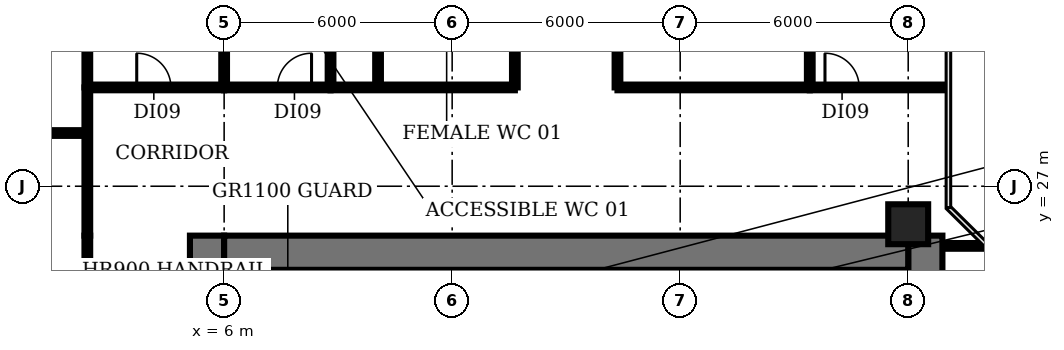
"""IFC4 building model, lengths in metres.
Left out: names, types, materials, properties, quantities, classifications, styles, units other than length and angle.
Written with IfcOpenShell. Run it as: python <this file> out.ifc"""

import sys

from ifc_helpers import new_model, si_unit, direction, frame, frame_2d, origin, origin_2d, place, context, subcontext, project, spatial, rectangle, circle, extrude, element, fill, save


model = new_model("IFC4")
c1 = context("Model", 3, precision=1e-05, world=origin(), true_north=direction((0.0, 1.0)))
c2 = subcontext(c1, "Body", "Model", "MODEL_VIEW")
j1 = project(units=[si_unit("LENGTHUNIT", "METRE"), si_unit("PLANEANGLEUNIT", "RADIAN")], contexts=[c1])
p1 = place(None, origin())
s1 = spatial("IfcSite", under=j1, at=p1, CompositionType="ELEMENT")
p2 = place(p1, origin())
s2 = spatial("IfcBuilding", under=s1, at=p2, CompositionType="ELEMENT")
p3 = place(p2, frame((0.0, 0.0, 54.2)))
s3 = spatial("IfcBuildingStorey", under=s2, at=p3, CompositionType="ELEMENT", Elevation=54.2)
p4 = place(p3, frame((24.0, 26.0, 0.0), z_axis=(0.0, 0.0, 1.0), x_axis=(1.0, 0.0, 0.0)))
e1 = element("IfcColumn", 1, at=p4, inside=s3, PredefinedType="COLUMN", context=c2, shape_type="SweptSolid", body=[
    extrude(circle(Radius=0.525, at=origin_2d()), origin(), (0.0, 0.0, 1.0), 3.85),
])
p5 = place(p3, frame((9.275, 18.375, 0.0), z_axis=(0.0, 0.0, 1.0), x_axis=(0.0, 1.0, 0.0)))
e2 = element("IfcWall", 2, at=p5, inside=s3, PredefinedType="SHEAR", context=c2, shape_type="SweptSolid", body=[
    extrude(rectangle(XDim=6.425, YDim=0.25, at=frame_2d((3.212, 0.0))), origin(), (0.0, 0.0, 1.0), 3.85),
])
for number, where, z_axis, x_axis in (
    (3, (15.1, 22.9, 0.0), (0.0, 0.0, 1.0), (0.0, 1.0, 0.0)),
    (4, (20.7, 22.9, 0.0), (0.0, 0.0, 1.0), (0.0, 1.0, 0.0)),
):
    element("IfcWall", number, at=place(p3, frame(where, z_axis=z_axis, x_axis=x_axis)), inside=s3, PredefinedType="SHEAR", context=c2, shape_type="SweptSolid", body=[
        extrude(rectangle(XDim=1.9, YDim=0.2, at=frame_2d((0.95, 0.0))), origin(), (0.0, 0.0, 1.0), 3.85),
    ])
p6 = place(p3, frame((5.55, 4.5, 0.0), z_axis=(0.0, 0.0, 1.0), x_axis=(0.0, 1.0, 0.0)))
e5 = element("IfcWall", 5, at=p6, inside=s3, PredefinedType="SHEAR", context=c2, shape_type="SweptSolid", body=[
    extrude(rectangle(XDim=21.2, YDim=0.9, at=frame_2d((10.6, 0.0))), origin(), (0.0, 0.0, 1.0), 3.85),
])
p7 = place(p6, frame((1.15, 0.0, 0.0)))
e6 = element("IfcOpeningElement", 6, at=p7, cuts=e5, PredefinedType="OPENING", context=c2, shape_type="SweptSolid", body=[
    extrude(rectangle(XDim=1.5, YDim=2.1, at=frame_2d((0.75, 1.05))), frame((0.0, 0.46, 0.0), z_axis=(0.0, -1.0, 0.0), x_axis=(1.0, 0.0, 0.0)), (0.0, 0.0, 1.0), 0.92),
])
p8 = place(p6, frame((7.6, 0.0, 0.0)))
e7 = element("IfcOpeningElement", 7, at=p8, cuts=e5, PredefinedType="OPENING", context=c2, shape_type="SweptSolid", body=[
    extrude(rectangle(XDim=1.2, YDim=2.1, at=frame_2d((0.6, 1.05))), frame((0.0, 0.46, 0.0), z_axis=(0.0, -1.0, 0.0), x_axis=(1.0, 0.0, 0.0)), (0.0, 0.0, 1.0), 0.92),
])
p9 = place(p6, frame((14.15, 0.0, 0.0)))
e8 = element("IfcOpeningElement", 8, at=p9, cuts=e5, PredefinedType="OPENING", context=c2, shape_type="SweptSolid", body=[
    extrude(rectangle(XDim=1.2, YDim=2.1, at=frame_2d((0.6, 1.05))), frame((0.0, 0.46, 0.0), z_axis=(0.0, -1.0, 0.0), x_axis=(1.0, 0.0, 0.0)), (0.0, 0.0, 1.0), 0.92),
])
p10 = place(p3, frame((24.45, 25.7, 0.0), z_axis=(0.0, 0.0, 1.0), x_axis=(0.0, -1.0, 0.0)))
e9 = element("IfcWall", 9, at=p10, inside=s3, PredefinedType="SHEAR", context=c2, shape_type="SweptSolid", body=[
    extrude(rectangle(XDim=21.2, YDim=0.9, at=frame_2d((10.6, 0.0))), origin(), (0.0, 0.0, 1.0), 3.85),
])
p11 = place(p10, frame((18.55, 0.0, 0.0)))
e10 = element("IfcOpeningElement", 10, at=p11, cuts=e9, PredefinedType="OPENING", context=c2, shape_type="SweptSolid", body=[
    extrude(rectangle(XDim=1.5, YDim=2.1, at=frame_2d((0.75, 1.05))), frame((0.0, 0.46, 0.0), z_axis=(0.0, -1.0, 0.0), x_axis=(1.0, 0.0, 0.0)), (0.0, 0.0, 1.0), 0.92),
])
p12 = place(p10, frame((12.45, 0.0, 0.0)))
e11 = element("IfcOpeningElement", 11, at=p12, cuts=e9, PredefinedType="OPENING", context=c2, shape_type="SweptSolid", body=[
    extrude(rectangle(XDim=0.9, YDim=2.1, at=frame_2d((0.45, 1.05))), frame((0.0, 0.46, 0.0), z_axis=(0.0, -1.0, 0.0), x_axis=(1.0, 0.0, 0.0)), (0.0, 0.0, 1.0), 0.92),
])
p13 = place(p10, frame((6.45, 0.0, 0.0)))
e12 = element("IfcOpeningElement", 12, at=p13, cuts=e9, PredefinedType="OPENING", context=c2, shape_type="SweptSolid", body=[
    extrude(rectangle(XDim=2.0, YDim=2.1, at=frame_2d((1.0, 1.05))), frame((0.0, 0.46, 0.0), z_axis=(0.0, -1.0, 0.0), x_axis=(1.0, 0.0, 0.0)), (0.0, 0.0, 1.0), 0.92),
])
p14 = place(p3, frame((6.0, 25.25, 0.0), z_axis=(0.0, 0.0, 1.0), x_axis=(1.0, 0.0, 0.0)))
e13 = element("IfcWall", 13, at=p14, inside=s3, PredefinedType="SHEAR", context=c2, shape_type="SweptSolid", body=[
    extrude(rectangle(XDim=18.0, YDim=0.9, at=frame_2d((9.0, 0.0))), origin(), (0.0, 0.0, 1.0), 3.85),
])
p15 = place(p3, frame((-1.04, 28.4, 0.0), z_axis=(0.0, 0.0, 1.0), x_axis=(1.0, 0.0, 0.0)))
e14 = element("IfcWall", 14, at=p15, inside=s3, PredefinedType="PARTITIONING", context=c2, shape_type="SweptSolid", body=[
    extrude(rectangle(XDim=3.44, YDim=0.15, at=frame_2d((1.72, 0.0))), origin(), (0.0, 0.0, 1.0), 2.83),
])
p16 = place(p3, frame((2.4, 4.5, 0.0), z_axis=(0.0, 0.0, 1.0), x_axis=(0.0, 1.0, 0.0)))
e15 = element("IfcWall", 15, at=p16, inside=s3, PredefinedType="PARTITIONING", context=c2, shape_type="SweptSolid", body=[
    extrude(rectangle(XDim=21.2, YDim=0.15, at=frame_2d((10.6, 0.0))), origin(), (0.0, 0.0, 1.0), 2.83),
])
p17 = place(p16, frame((10.8, 0.0, 0.0)))
e16 = element("IfcOpeningElement", 16, at=p17, cuts=e15, PredefinedType="OPENING", context=c2, shape_type="SweptSolid", body=[
    extrude(rectangle(XDim=1.2, YDim=2.1, at=frame_2d((0.6, 1.05))), frame((0.0, 0.085, 0.0), z_axis=(0.0, -1.0, 0.0), x_axis=(1.0, 0.0, 0.0)), (0.0, 0.0, 1.0), 0.17),
])
p18 = place(p3, frame((2.4, 25.7, 0.0), z_axis=(0.0, 0.0, 1.0), x_axis=(0.0, 1.0, 0.0)))
e17 = element("IfcWall", 17, at=p18, inside=s3, PredefinedType="PARTITIONING", context=c2, shape_type="SweptSolid", body=[
    extrude(rectangle(XDim=3.9, YDim=0.15, at=frame_2d((1.95, 0.0))), origin(), (0.0, 0.0, 1.0), 2.83),
])
p19 = place(p3, frame((2.4, 29.6, 0.0), z_axis=(0.0, 0.0, 1.0), x_axis=(0.0, 1.0, 0.0)))
e18 = element("IfcWall", 18, at=p19, inside=s3, PredefinedType="PARTITIONING", context=c2, shape_type="SweptSolid", body=[
    extrude(rectangle(XDim=4.8, YDim=0.15, at=frame_2d((2.4, 0.0))), origin(), (0.0, 0.0, 1.0), 2.83),
])
p20 = place(p3, frame((2.4, 29.6, 0.0), z_axis=(0.0, 0.0, 1.0), x_axis=(1.0, 0.0, 0.0)))
e19 = element("IfcWall", 19, at=p20, inside=s3, PredefinedType="PARTITIONING", context=c2, shape_type="SweptSolid", body=[
    extrude(rectangle(XDim=3.6, YDim=0.15, at=frame_2d((1.8, 0.0))), origin(), (0.0, 0.0, 1.0), 2.83),
])
p21 = place(p20, frame((1.3, 0.0, 0.0)))
e20 = element("IfcOpeningElement", 20, at=p21, cuts=e19, PredefinedType="OPENING", context=c2, shape_type="SweptSolid", body=[
    extrude(rectangle(XDim=0.9, YDim=2.1, at=frame_2d((0.45, 1.05))), frame((0.0, 0.085, 0.0), z_axis=(0.0, -1.0, 0.0), x_axis=(1.0, 0.0, 0.0)), (0.0, 0.0, 1.0), 0.17),
])
p22 = place(p3, frame((6.0, 29.6, 0.0), z_axis=(0.0, 0.0, 1.0), x_axis=(0.0, 1.0, 0.0)))
e21 = element("IfcWall", 21, at=p22, inside=s3, PredefinedType="PARTITIONING", context=c2, shape_type="SweptSolid", body=[
    extrude(rectangle(XDim=4.8, YDim=0.15, at=frame_2d((2.4, 0.0))), origin(), (0.0, 0.0, 1.0), 2.83),
])
p23 = place(p3, frame((6.0, 29.6, 0.0), z_axis=(0.0, 0.0, 1.0), x_axis=(1.0, 0.0, 0.0)))
e22 = element("IfcWall", 22, at=p23, inside=s3, PredefinedType="PARTITIONING", context=c2, shape_type="SweptSolid", body=[
    extrude(rectangle(XDim=2.8, YDim=0.15, at=frame_2d((1.4, 0.0))), origin(), (0.0, 0.0, 1.0), 2.83),
])
p24 = place(p23, frame((1.4, 0.0, 0.0)))
e23 = element("IfcOpeningElement", 23, at=p24, cuts=e22, PredefinedType="OPENING", context=c2, shape_type="SweptSolid", body=[
    extrude(rectangle(XDim=0.9, YDim=2.1, at=frame_2d((0.45, 1.05))), frame((0.0, 0.085, 0.0), z_axis=(0.0, -1.0, 0.0), x_axis=(1.0, 0.0, 0.0)), (0.0, 0.0, 1.0), 0.17),
])
p25 = place(p3, frame((8.8, 29.6, 0.0), z_axis=(0.0, 0.0, 1.0), x_axis=(0.0, 1.0, 0.0)))
e24 = element("IfcWall", 24, at=p25, inside=s3, PredefinedType="PARTITIONING", context=c2, shape_type="SweptSolid", body=[
    extrude(rectangle(XDim=4.8, YDim=0.15, at=frame_2d((2.4, 0.0))), origin(), (0.0, 0.0, 1.0), 2.83),
])
p26 = place(p3, frame((8.8, 29.6, 0.0), z_axis=(0.0, 0.0, 1.0), x_axis=(1.0, 0.0, 0.0)))
e25 = element("IfcWall", 25, at=p26, inside=s3, PredefinedType="PARTITIONING", context=c2, shape_type="SweptSolid", body=[
    extrude(rectangle(XDim=4.85, YDim=0.15, at=frame_2d((2.425, 0.0))), origin(), (0.0, 0.0, 1.0), 2.83),
])
p27 = place(p3, frame((10.05, 29.6, 0.0), z_axis=(0.0, 0.0, 1.0), x_axis=(0.0, 1.0, 0.0)))
e26 = element("IfcWall", 26, at=p27, inside=s3, PredefinedType="PARTITIONING", context=c2, shape_type="SweptSolid", body=[
    extrude(rectangle(XDim=4.8, YDim=0.15, at=frame_2d((2.4, 0.0))), origin(), (0.0, 0.0, 1.0), 2.83),
])
p28 = place(p3, frame((13.65, 29.6, 0.0), z_axis=(0.0, 0.0, 1.0), x_axis=(0.0, 1.0, 0.0)))
e27 = element("IfcWall", 27, at=p28, inside=s3, PredefinedType="PARTITIONING", context=c2, shape_type="SweptSolid", body=[
    extrude(rectangle(XDim=4.8, YDim=0.15, at=frame_2d((2.4, 0.0))), origin(), (0.0, 0.0, 1.0), 2.83),
])
p29 = place(p28, frame((1.9, 0.0, 0.0)))
e28 = element("IfcOpeningElement", 28, at=p29, cuts=e27, PredefinedType="OPENING", context=c2, shape_type="SweptSolid", body=[
    extrude(rectangle(XDim=0.9, YDim=2.1, at=frame_2d((0.45, 1.05))), frame((0.0, 0.085, 0.0), z_axis=(0.0, -1.0, 0.0), x_axis=(1.0, 0.0, 0.0)), (0.0, 0.0, 1.0), 0.17),
])
p30 = place(p3, frame((16.35, 29.6, 0.0), z_axis=(0.0, 0.0, 1.0), x_axis=(0.0, 1.0, 0.0)))
e29 = element("IfcWall", 29, at=p30, inside=s3, PredefinedType="PARTITIONING", context=c2, shape_type="SweptSolid", body=[
    extrude(rectangle(XDim=4.8, YDim=0.15, at=frame_2d((2.4, 0.0))), origin(), (0.0, 0.0, 1.0), 2.83),
])
p31 = place(p3, frame((16.35, 29.6, 0.0), z_axis=(0.0, 0.0, 1.0), x_axis=(1.0, 0.0, 0.0)))
e30 = element("IfcWall", 30, at=p31, inside=s3, PredefinedType="PARTITIONING", context=c2, shape_type="SweptSolid", body=[
    extrude(rectangle(XDim=5.06, YDim=0.15, at=frame_2d((2.53, 0.0))), origin(), (0.0, 0.0, 1.0), 2.83),
])
p32 = place(p3, frame((21.41, 29.6, 0.0), z_axis=(0.0, 0.0, 1.0), x_axis=(0.0, 1.0, 0.0)))
e31 = element("IfcWall", 31, at=p32, inside=s3, PredefinedType="PARTITIONING", context=c2, shape_type="SweptSolid", body=[
    extrude(rectangle(XDim=4.8, YDim=0.15, at=frame_2d((2.4, 0.0))), origin(), (0.0, 0.0, 1.0), 2.83),
])
p33 = place(p3, frame((21.41, 29.6, 0.0), z_axis=(0.0, 0.0, 1.0), x_axis=(1.0, 0.0, 0.0)))
e32 = element("IfcWall", 32, at=p33, inside=s3, PredefinedType="PARTITIONING", context=c2, shape_type="SweptSolid", body=[
    extrude(rectangle(XDim=3.6, YDim=0.15, at=frame_2d((1.8, 0.0))), origin(), (0.0, 0.0, 1.0), 2.83),
])
p34 = place(p33, frame((0.4, 0.0, 0.0)))
e33 = element("IfcOpeningElement", 33, at=p34, cuts=e32, PredefinedType="OPENING", context=c2, shape_type="SweptSolid", body=[
    extrude(rectangle(XDim=0.9, YDim=2.1, at=frame_2d((0.45, 1.05))), frame((0.0, 0.085, 0.0), z_axis=(0.0, -1.0, 0.0), x_axis=(1.0, 0.0, 0.0)), (0.0, 0.0, 1.0), 0.17),
])
p35 = place(p3, frame((25.0, 25.43, 0.0), z_axis=(0.0, 0.0, 1.0), x_axis=(1.0, 0.0, 0.0)))
e34 = element("IfcWall", 34, at=p35, inside=s3, PredefinedType="PARTITIONING", context=c2, shape_type="SweptSolid", body=[
    extrude(rectangle(XDim=1.01, YDim=0.15, at=frame_2d((0.505, 0.0))), origin(), (0.0, 0.0, 1.0), 2.83),
])
p36 = place(p21, origin())
e35 = element("IfcDoor", 35, at=p36, inside=s3, OperationType="SINGLE_SWING_LEFT", PredefinedType="DOOR", context=c2, shape_type="SweptSolid", body=[
    extrude(rectangle(XDim=0.9, YDim=2.1, at=frame_2d((0.45, 1.05))), frame((0.0, 0.025, 0.0), z_axis=(0.0, -1.0, 0.0), x_axis=(1.0, 0.0, 0.0)), (0.0, 0.0, 1.0), 0.05),
])
fill(e20, e35)
p37 = place(p24, origin())
e36 = element("IfcDoor", 36, at=p37, inside=s3, OperationType="SINGLE_SWING_RIGHT", PredefinedType="DOOR", context=c2, shape_type="SweptSolid", body=[
    extrude(rectangle(XDim=0.9, YDim=2.1, at=frame_2d((0.45, 1.05))), frame((0.0, 0.025, 0.0), z_axis=(0.0, -1.0, 0.0), x_axis=(1.0, 0.0, 0.0)), (0.0, 0.0, 1.0), 0.05),
])
fill(e23, e36)
p38 = place(p34, origin())
e37 = element("IfcDoor", 37, at=p38, inside=s3, OperationType="SINGLE_SWING_LEFT", PredefinedType="DOOR", context=c2, shape_type="SweptSolid", body=[
    extrude(rectangle(XDim=0.9, YDim=2.1, at=frame_2d((0.45, 1.05))), frame((0.0, 0.025, 0.0), z_axis=(0.0, -1.0, 0.0), x_axis=(1.0, 0.0, 0.0)), (0.0, 0.0, 1.0), 0.05),
])
fill(e33, e37)
save(model, sys.argv[1])
